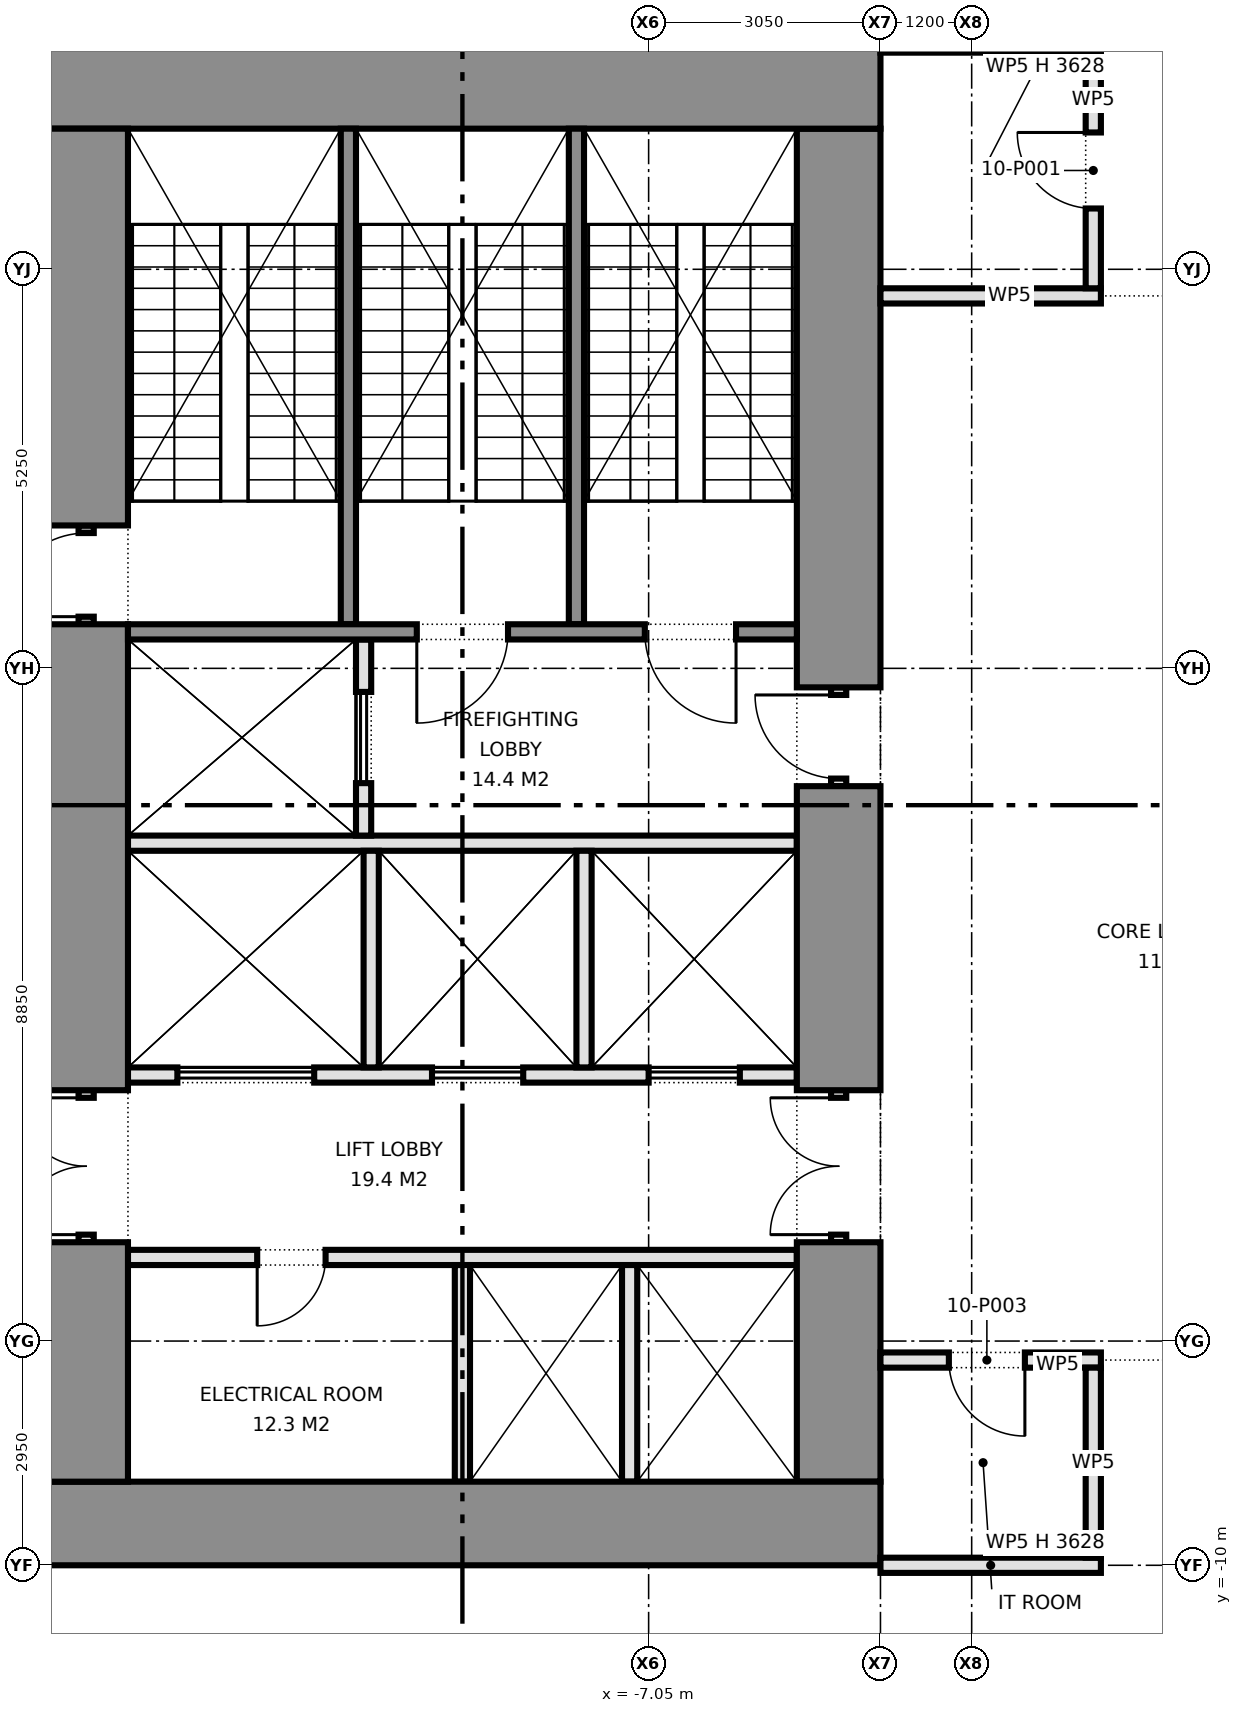
"""IFC4 building model, lengths in metres.
Left out: names, types, materials, properties, quantities, classifications, styles, units other than length and angle.
Written with IfcOpenShell. Run it as: python <this file> out.ifc"""

import sys

from ifc_helpers import new_model, si_unit, direction, frame, frame_2d, origin, place, context, subcontext, project, spatial, rectangle, extrude, element, fill, save


model = new_model("IFC4")
c1 = context("Model", 3, precision=1e-05, world=origin(), true_north=direction((0.0, 1.0)))
c2 = subcontext(c1, "Body", "Model", "MODEL_VIEW")
j1 = project(units=[si_unit("LENGTHUNIT", "METRE"), si_unit("PLANEANGLEUNIT", "RADIAN")], contexts=[c1])
p1 = place(None, origin())
s1 = spatial("IfcSite", under=j1, at=p1, CompositionType="ELEMENT")
p2 = place(p1, origin())
s2 = spatial("IfcBuilding", under=s1, at=p2, CompositionType="ELEMENT")
p3 = place(p2, frame((0.0, 0.0, 44.9)))
s3 = spatial("IfcBuildingStorey", under=s2, at=p3, CompositionType="ELEMENT", Elevation=44.9)
for number, where, z_axis, x_axis in (
    (1, (-15.0, -9.45, 0.0), (0.0, 0.0, 1.0), (1.0, 0.0, 0.0)),
    (2, (-15.0, 9.45, 0.0), (0.0, 0.0, 1.0), (1.0, 0.0, 0.0)),
):
    element("IfcWall", number, at=place(p3, frame(where, z_axis=z_axis, x_axis=x_axis)), inside=s3, PredefinedType="SHEAR", context=c2, shape_type="SweptSolid", body=[
        extrude(rectangle(XDim=11.0, YDim=1.1, at=frame_2d((5.5, 0.0))), origin(), (0.0, 0.0, 1.0), 4.575),
    ])
p4 = place(p3, frame((-14.45, -8.9, 0.0), z_axis=(0.0, 0.0, 1.0), x_axis=(0.0, 1.0, 0.0)))
e3 = element("IfcWall", 3, at=p4, inside=s3, PredefinedType="SHEAR", context=c2, shape_type="SweptSolid", body=[
    extrude(rectangle(XDim=3.15, YDim=1.1, at=frame_2d((1.575, 0.0))), origin(), (0.0, 0.0, 1.0), 4.575),
])
p5 = place(p3, frame((-14.45, -5.75, 0.0), z_axis=(0.0, 0.0, 1.0), x_axis=(0.0, 1.0, 0.0)))
e4 = element("IfcWall", 4, at=p5, inside=s3, PredefinedType="PARTITIONING", context=c2, shape_type="SweptSolid", body=[
    extrude(rectangle(XDim=2.0, YDim=0.2, at=frame_2d((1.0, 0.0))), origin(), (0.0, 0.0, 1.0), 2.4),
])
p6 = place(p5, frame((0.1, 0.0, 0.0)))
e5 = element("IfcOpeningElement", 5, at=p6, cuts=e4, PredefinedType="OPENING", context=c2, shape_type="SweptSolid", body=[
    extrude(rectangle(XDim=1.8, YDim=2.1, at=frame_2d((0.9, 1.05))), frame((0.0, 0.11, 0.0), z_axis=(0.0, -1.0, 0.0), x_axis=(1.0, 0.0, 0.0)), (0.0, 0.0, 1.0), 0.22),
])
p7 = place(p3, frame((-14.45, -3.75, 0.0), z_axis=(0.0, 0.0, 1.0), x_axis=(0.0, 1.0, 0.0)))
e6 = element("IfcWall", 6, at=p7, inside=s3, PredefinedType="SHEAR", context=c2, shape_type="SweptSolid", body=[
    extrude(rectangle(XDim=6.13, YDim=1.1, at=frame_2d((3.065, 0.0))), origin(), (0.0, 0.0, 1.0), 4.575),
])
p8 = place(p3, frame((-14.45, 2.38, 0.0), z_axis=(0.0, 0.0, 1.0), x_axis=(0.0, 1.0, 0.0)))
e7 = element("IfcWall", 7, at=p8, inside=s3, PredefinedType="SHEAR", context=c2, shape_type="SweptSolid", body=[
    extrude(rectangle(XDim=1.3, YDim=0.2, at=frame_2d((0.65, 0.0))), origin(), (0.0, 0.0, 1.0), 2.4),
])
p9 = place(p8, frame((0.1, 0.0, 0.0)))
e8 = element("IfcOpeningElement", 8, at=p9, cuts=e7, PredefinedType="OPENING", context=c2, shape_type="SweptSolid", body=[
    extrude(rectangle(XDim=1.1, YDim=2.1, at=frame_2d((0.55, 1.05))), frame((0.0, 0.11, 0.0), z_axis=(0.0, -1.0, 0.0), x_axis=(1.0, 0.0, 0.0)), (0.0, 0.0, 1.0), 0.22),
])
p10 = place(p3, frame((-14.45, 3.68, 0.0), z_axis=(0.0, 0.0, 1.0), x_axis=(0.0, 1.0, 0.0)))
e9 = element("IfcWall", 9, at=p10, inside=s3, PredefinedType="SHEAR", context=c2, shape_type="SweptSolid", body=[
    extrude(rectangle(XDim=5.22, YDim=1.1, at=frame_2d((2.61, 0.0))), origin(), (0.0, 0.0, 1.0), 4.575),
])
p11 = place(p3, frame((-4.55, -8.9, 0.0), z_axis=(0.0, 0.0, 1.0), x_axis=(0.0, 1.0, 0.0)))
e10 = element("IfcWall", 10, at=p11, inside=s3, PredefinedType="SHEAR", context=c2, shape_type="SweptSolid", body=[
    extrude(rectangle(XDim=3.15, YDim=1.1, at=frame_2d((1.575, 0.0))), origin(), (0.0, 0.0, 1.0), 4.575),
])
p12 = place(p3, frame((-4.55, -5.75, 0.0), z_axis=(0.0, 0.0, 1.0), x_axis=(0.0, 1.0, 0.0)))
e11 = element("IfcWall", 11, at=p12, inside=s3, PredefinedType="PARTITIONING", context=c2, shape_type="SweptSolid", body=[
    extrude(rectangle(XDim=2.0, YDim=0.2, at=frame_2d((1.0, 0.0))), origin(), (0.0, 0.0, 1.0), 2.4),
])
p13 = place(p12, frame((0.1, 0.0, 0.0)))
e12 = element("IfcOpeningElement", 12, at=p13, cuts=e11, PredefinedType="OPENING", context=c2, shape_type="SweptSolid", body=[
    extrude(rectangle(XDim=1.8, YDim=2.1, at=frame_2d((0.9, 1.05))), frame((0.0, 0.11, 0.0), z_axis=(0.0, -1.0, 0.0), x_axis=(1.0, 0.0, 0.0)), (0.0, 0.0, 1.0), 0.22),
])
p14 = place(p3, frame((-4.55, -3.75, 0.0), z_axis=(0.0, 0.0, 1.0), x_axis=(0.0, 1.0, 0.0)))
e13 = element("IfcWall", 13, at=p14, inside=s3, PredefinedType="SHEAR", context=c2, shape_type="SweptSolid", body=[
    extrude(rectangle(XDim=4.0, YDim=1.1, at=frame_2d((2.0, 0.0))), origin(), (0.0, 0.0, 1.0), 4.575),
])
p15 = place(p3, frame((-4.55, 0.25, 0.0), z_axis=(0.0, 0.0, 1.0), x_axis=(0.0, 1.0, 0.0)))
e14 = element("IfcWall", 14, at=p15, inside=s3, PredefinedType="PARTITIONING", context=c2, shape_type="SweptSolid", body=[
    extrude(rectangle(XDim=1.3, YDim=0.2, at=frame_2d((0.65, 0.0))), origin(), (0.0, 0.0, 1.0), 2.4),
])
p16 = place(p15, frame((0.1, 0.0, 0.0)))
e15 = element("IfcOpeningElement", 15, at=p16, cuts=e14, PredefinedType="OPENING", context=c2, shape_type="SweptSolid", body=[
    extrude(rectangle(XDim=1.1, YDim=2.1, at=frame_2d((0.55, 1.05))), frame((0.0, 0.11, 0.0), z_axis=(0.0, -1.0, 0.0), x_axis=(1.0, 0.0, 0.0)), (0.0, 0.0, 1.0), 0.22),
])
p17 = place(p3, frame((-4.55, 1.55, 0.0), z_axis=(0.0, 0.0, 1.0), x_axis=(0.0, 1.0, 0.0)))
e16 = element("IfcWall", 16, at=p17, inside=s3, PredefinedType="SHEAR", context=c2, shape_type="SweptSolid", body=[
    extrude(rectangle(XDim=7.35, YDim=1.1, at=frame_2d((3.675, 0.0))), origin(), (0.0, 0.0, 1.0), 4.575),
])
p18 = place(p3, frame((-13.9, -5.95, 0.0), z_axis=(0.0, 0.0, 1.0), x_axis=(1.0, 0.0, 0.0)))
e17 = element("IfcWall", 17, at=p18, inside=s3, PredefinedType="PARTITIONING", context=c2, shape_type="SweptSolid", body=[
    extrude(rectangle(XDim=8.8, YDim=0.2, at=frame_2d((4.4, 0.0))), origin(), (0.0, 0.0, 1.0), 4.575),
])
p19 = place(p18, frame((1.7, 0.0, 0.0)))
e18 = element("IfcOpeningElement", 18, at=p19, cuts=e17, PredefinedType="OPENING", context=c2, shape_type="SweptSolid", body=[
    extrude(rectangle(XDim=0.9, YDim=2.1, at=frame_2d((0.45, 1.05))), frame((0.0, 0.11, 0.0), z_axis=(0.0, -1.0, 0.0), x_axis=(1.0, 0.0, 0.0)), (0.0, 0.0, 1.0), 0.22),
])
p20 = place(p3, frame((-13.9, -3.55, 0.0), z_axis=(0.0, 0.0, 1.0), x_axis=(1.0, 0.0, 0.0)))
e19 = element("IfcWall", 19, at=p20, inside=s3, PredefinedType="PARTITIONING", context=c2, shape_type="SweptSolid", body=[
    extrude(rectangle(XDim=8.8, YDim=0.2, at=frame_2d((4.4, 0.0))), origin(), (0.0, 0.0, 1.0), 4.575),
])
p21 = place(p20, frame((0.65, 0.0, 0.0)))
e20 = element("IfcOpeningElement", 20, at=p21, cuts=e19, PredefinedType="OPENING", context=c2, shape_type="SweptSolid", body=[
    extrude(rectangle(XDim=1.8, YDim=2.1, at=frame_2d((0.9, 1.05))), frame((0.0, 0.11, 0.0), z_axis=(0.0, -1.0, 0.0), x_axis=(1.0, 0.0, 0.0)), (0.0, 0.0, 1.0), 0.22),
])
p22 = place(p20, frame((4.0, 0.0, 0.0)))
e21 = element("IfcOpeningElement", 21, at=p22, cuts=e19, PredefinedType="OPENING", context=c2, shape_type="SweptSolid", body=[
    extrude(rectangle(XDim=1.2, YDim=2.1, at=frame_2d((0.6, 1.05))), frame((0.0, 0.11, 0.0), z_axis=(0.0, -1.0, 0.0), x_axis=(1.0, 0.0, 0.0)), (0.0, 0.0, 1.0), 0.22),
])
p23 = place(p20, frame((6.85, 0.0, 0.0)))
e22 = element("IfcOpeningElement", 22, at=p23, cuts=e19, PredefinedType="OPENING", context=c2, shape_type="SweptSolid", body=[
    extrude(rectangle(XDim=1.2, YDim=2.1, at=frame_2d((0.6, 1.05))), frame((0.0, 0.11, 0.0), z_axis=(0.0, -1.0, 0.0), x_axis=(1.0, 0.0, 0.0)), (0.0, 0.0, 1.0), 0.22),
])
p24 = place(p3, frame((-13.9, -0.5, 0.0), z_axis=(0.0, 0.0, 1.0), x_axis=(1.0, 0.0, 0.0)))
e23 = element("IfcWall", 23, at=p24, inside=s3, PredefinedType="PARTITIONING", context=c2, shape_type="SweptSolid", body=[
    extrude(rectangle(XDim=8.8, YDim=0.2, at=frame_2d((4.4, 0.0))), origin(), (0.0, 0.0, 1.0), 4.575),
])
p25 = place(p3, frame((-10.8, -0.4, 0.0), z_axis=(0.0, 0.0, 1.0), x_axis=(0.0, 1.0, 0.0)))
e24 = element("IfcWall", 24, at=p25, inside=s3, PredefinedType="PARTITIONING", context=c2, shape_type="SweptSolid", body=[
    extrude(rectangle(XDim=2.58, YDim=0.2, at=frame_2d((1.29, 0.0))), origin(), (0.0, 0.0, 1.0), 4.575),
])
p26 = place(p25, frame((0.69, 0.0, 0.0)))
e25 = element("IfcOpeningElement", 25, at=p26, cuts=e24, PredefinedType="OPENING", context=c2, shape_type="SweptSolid", body=[
    extrude(rectangle(XDim=1.2, YDim=2.1, at=frame_2d((0.6, 1.05))), frame((0.0, 0.11, 0.0), z_axis=(0.0, -1.0, 0.0), x_axis=(1.0, 0.0, 0.0)), (0.0, 0.0, 1.0), 0.22),
])
p27 = place(p3, frame((-13.9, 2.28, 0.0), z_axis=(0.0, 0.0, 1.0), x_axis=(1.0, 0.0, 0.0)))
e26 = element("IfcWall", 26, at=p27, inside=s3, PredefinedType="SHEAR", context=c2, shape_type="SweptSolid", body=[
    extrude(rectangle(XDim=8.8, YDim=0.2, at=frame_2d((4.4, 0.0))), origin(), (0.0, 0.0, 1.0), 4.575),
])
p28 = place(p27, frame((3.8, 0.0, 0.0)))
e27 = element("IfcOpeningElement", 27, at=p28, cuts=e26, PredefinedType="OPENING", context=c2, shape_type="SweptSolid", body=[
    extrude(rectangle(XDim=1.2, YDim=2.1, at=frame_2d((0.6, 1.05))), frame((0.0, 0.11, 0.0), z_axis=(0.0, -1.0, 0.0), x_axis=(1.0, 0.0, 0.0)), (0.0, 0.0, 1.0), 0.22),
])
p29 = place(p27, frame((6.8, 0.0, 0.0)))
e28 = element("IfcOpeningElement", 28, at=p29, cuts=e26, PredefinedType="OPENING", context=c2, shape_type="SweptSolid", body=[
    extrude(rectangle(XDim=1.2, YDim=2.1, at=frame_2d((0.6, 1.05))), frame((0.0, 0.11, 0.0), z_axis=(0.0, -1.0, 0.0), x_axis=(1.0, 0.0, 0.0)), (0.0, 0.0, 1.0), 0.22),
])
for number, where, z_axis, x_axis in (
    (29, (-11.0, 2.38, 0.0), (0.0, 0.0, 1.0), (0.0, 1.0, 0.0)),
    (30, (-8.0, 2.38, 0.0), (0.0, 0.0, 1.0), (0.0, 1.0, 0.0)),
):
    element("IfcWall", number, at=place(p3, frame(where, z_axis=z_axis, x_axis=x_axis)), inside=s3, PredefinedType="SHEAR", context=c2, shape_type="SweptSolid", body=[
        extrude(rectangle(XDim=6.52, YDim=0.2, at=frame_2d((3.26, 0.0))), origin(), (0.0, 0.0, 1.0), 4.575),
    ])
for number, where, z_axis, x_axis in (
    (31, (-9.5, -8.9, 0.0), (0.0, 0.0, 1.0), (0.0, 1.0, 0.0)),
    (32, (-7.3, -8.9, 0.0), (0.0, 0.0, 1.0), (0.0, 1.0, 0.0)),
    (33, (-10.7, -3.45, 0.0), (0.0, 0.0, 1.0), (0.0, 1.0, 0.0)),
    (34, (-7.9, -3.45, 0.0), (0.0, 0.0, 1.0), (0.0, 1.0, 0.0)),
):
    element("IfcWall", number, at=place(p3, frame(where, z_axis=z_axis, x_axis=x_axis)), inside=s3, PredefinedType="PARTITIONING", context=c2, shape_type="SweptSolid", body=[
        extrude(rectangle(XDim=2.85, YDim=0.2, at=frame_2d((1.425, 0.0))), origin(), (0.0, 0.0, 1.0), 4.575),
    ])
p30 = place(p3, frame((-4.0, -10.0, 0.0), z_axis=(0.0, 0.0, 1.0), x_axis=(1.0, 0.0, 0.0)))
e35 = element("IfcWall", 35, at=p30, inside=s3, PredefinedType="PARTITIONING", context=c2, shape_type="SweptSolid", body=[
    extrude(rectangle(XDim=2.9, YDim=0.2, at=frame_2d((1.45, 0.0))), origin(), (0.0, 0.0, 1.0), 3.628),
])
p31 = place(p3, frame((-4.0, -7.3, 0.0), z_axis=(0.0, 0.0, 1.0), x_axis=(1.0, 0.0, 0.0)))
e36 = element("IfcWall", 36, at=p31, inside=s3, PredefinedType="PARTITIONING", context=c2, shape_type="SweptSolid", body=[
    extrude(rectangle(XDim=2.9, YDim=0.2, at=frame_2d((1.45, 0.0))), origin(), (0.0, 0.0, 1.0), 4.575),
])
p32 = place(p31, frame((0.9, 0.0, 0.0)))
e37 = element("IfcOpeningElement", 37, at=p32, cuts=e36, PredefinedType="OPENING", context=c2, shape_type="SweptSolid", body=[
    extrude(rectangle(XDim=1.0, YDim=2.1, at=frame_2d((0.5, 1.05))), frame((0.0, 0.11, 0.0), z_axis=(0.0, -1.0, 0.0), x_axis=(1.0, 0.0, 0.0)), (0.0, 0.0, 1.0), 0.22),
])
p33 = place(p3, frame((-4.0, 6.7, 0.0), z_axis=(0.0, 0.0, 1.0), x_axis=(1.0, 0.0, 0.0)))
e38 = element("IfcWall", 38, at=p33, inside=s3, PredefinedType="PARTITIONING", context=c2, shape_type="SweptSolid", body=[
    extrude(rectangle(XDim=2.9, YDim=0.2, at=frame_2d((1.45, 0.0))), origin(), (0.0, 0.0, 1.0), 4.575),
])
p34 = place(p3, frame((-1.2, -9.9, 0.0), z_axis=(0.0, 0.0, 1.0), x_axis=(0.0, 1.0, 0.0)))
e39 = element("IfcWall", 39, at=p34, inside=s3, PredefinedType="PARTITIONING", context=c2, shape_type="SweptSolid", body=[
    extrude(rectangle(XDim=2.5, YDim=0.2, at=frame_2d((1.25, 0.0))), origin(), (0.0, 0.0, 1.0), 4.575),
])
p35 = place(p3, frame((-1.2, 6.8, 0.0), z_axis=(0.0, 0.0, 1.0), x_axis=(0.0, 1.0, 0.0)))
e40 = element("IfcWall", 40, at=p35, inside=s3, PredefinedType="PARTITIONING", context=c2, shape_type="SweptSolid", body=[
    extrude(rectangle(XDim=3.1, YDim=0.2, at=frame_2d((1.55, 0.0))), origin(), (0.0, 0.0, 1.0), 4.575),
])
p36 = place(p35, frame((1.05, 0.0, 0.0)))
e41 = element("IfcOpeningElement", 41, at=p36, cuts=e40, PredefinedType="OPENING", context=c2, shape_type="SweptSolid", body=[
    extrude(rectangle(XDim=1.0, YDim=2.1, at=frame_2d((0.5, 1.05))), frame((0.0, 0.11, 0.0), z_axis=(0.0, -1.0, 0.0), x_axis=(1.0, 0.0, 0.0)), (0.0, 0.0, 1.0), 0.22),
])
p37 = place(p6, origin())
e42 = element("IfcDoor", 42, at=p37, inside=s3, OperationType="DOUBLE_DOOR_SINGLE_SWING", PredefinedType="DOOR", context=c2, shape_type="SweptSolid", body=[
    extrude(rectangle(XDim=1.8, YDim=2.1, at=frame_2d((0.9, 1.05))), frame((0.0, 0.025, 0.0), z_axis=(0.0, -1.0, 0.0), x_axis=(1.0, 0.0, 0.0)), (0.0, 0.0, 1.0), 0.05),
])
fill(e5, e42)
p38 = place(p9, origin())
e43 = element("IfcDoor", 43, at=p38, inside=s3, OperationType="SINGLE_SWING_LEFT", PredefinedType="DOOR", context=c2, shape_type="SweptSolid", body=[
    extrude(rectangle(XDim=1.1, YDim=2.1, at=frame_2d((0.55, 1.05))), frame((0.0, 0.025, 0.0), z_axis=(0.0, -1.0, 0.0), x_axis=(1.0, 0.0, 0.0)), (0.0, 0.0, 1.0), 0.05),
])
fill(e8, e43)
p39 = place(p13, origin())
e44 = element("IfcDoor", 44, at=p39, inside=s3, OperationType="DOUBLE_DOOR_SINGLE_SWING", PredefinedType="DOOR", context=c2, shape_type="SweptSolid", body=[
    extrude(rectangle(XDim=1.8, YDim=2.1, at=frame_2d((0.9, 1.05))), frame((0.0, 0.025, 0.0), z_axis=(0.0, -1.0, 0.0), x_axis=(1.0, 0.0, 0.0)), (0.0, 0.0, 1.0), 0.05),
])
fill(e12, e44)
p40 = place(p16, origin())
e45 = element("IfcDoor", 45, at=p40, inside=s3, OperationType="SINGLE_SWING_RIGHT", PredefinedType="DOOR", context=c2, shape_type="SweptSolid", body=[
    extrude(rectangle(XDim=1.1, YDim=2.1, at=frame_2d((0.55, 1.05))), frame((0.0, 0.025, 0.0), z_axis=(0.0, -1.0, 0.0), x_axis=(1.0, 0.0, 0.0)), (0.0, 0.0, 1.0), 0.05),
])
fill(e15, e45)
p41 = place(p21, origin())
e46 = element("IfcDoor", 46, at=p41, inside=s3, OperationType="DOUBLE_DOOR_SLIDING", PredefinedType="DOOR", context=c2, shape_type="SweptSolid", body=[
    extrude(rectangle(XDim=1.8, YDim=2.1, at=frame_2d((0.9, 1.05))), frame((0.0, 0.025, 0.0), z_axis=(0.0, -1.0, 0.0), x_axis=(1.0, 0.0, 0.0)), (0.0, 0.0, 1.0), 0.05),
])
fill(e20, e46)
p42 = place(p22, origin())
e47 = element("IfcDoor", 47, at=p42, inside=s3, OperationType="DOUBLE_DOOR_SLIDING", PredefinedType="DOOR", context=c2, shape_type="SweptSolid", body=[
    extrude(rectangle(XDim=1.2, YDim=2.1, at=frame_2d((0.6, 1.05))), frame((0.0, 0.025, 0.0), z_axis=(0.0, -1.0, 0.0), x_axis=(1.0, 0.0, 0.0)), (0.0, 0.0, 1.0), 0.05),
])
fill(e21, e47)
p43 = place(p23, origin())
e48 = element("IfcDoor", 48, at=p43, inside=s3, OperationType="DOUBLE_DOOR_SLIDING", PredefinedType="DOOR", context=c2, shape_type="SweptSolid", body=[
    extrude(rectangle(XDim=1.2, YDim=2.1, at=frame_2d((0.6, 1.05))), frame((0.0, 0.025, 0.0), z_axis=(0.0, -1.0, 0.0), x_axis=(1.0, 0.0, 0.0)), (0.0, 0.0, 1.0), 0.05),
])
fill(e22, e48)
p44 = place(p26, origin())
e49 = element("IfcDoor", 49, at=p44, inside=s3, OperationType="DOUBLE_DOOR_SLIDING", PredefinedType="DOOR", context=c2, shape_type="SweptSolid", body=[
    extrude(rectangle(XDim=1.2, YDim=2.1, at=frame_2d((0.6, 1.05))), frame((0.0, 0.025, 0.0), z_axis=(0.0, -1.0, 0.0), x_axis=(1.0, 0.0, 0.0)), (0.0, 0.0, 1.0), 0.05),
])
fill(e25, e49)
p45 = place(p19, frame((0.9, 0.0, 0.0), z_axis=(0.0, 0.0, 1.0), x_axis=(-1.0, 0.0, 0.0)))
e50 = element("IfcDoor", 50, at=p45, inside=s3, OperationType="SINGLE_SWING_RIGHT", PredefinedType="DOOR", context=c2, shape_type="SweptSolid", body=[
    extrude(rectangle(XDim=0.9, YDim=2.1, at=frame_2d((0.45, 1.05))), frame((0.0, 0.025, 0.0), z_axis=(0.0, -1.0, 0.0), x_axis=(1.0, 0.0, 0.0)), (0.0, 0.0, 1.0), 0.05),
])
fill(e18, e50)
p46 = place(p28, frame((1.2, 0.0, 0.0), z_axis=(0.0, 0.0, 1.0), x_axis=(-1.0, 0.0, 0.0)))
e51 = element("IfcDoor", 51, at=p46, inside=s3, OperationType="SINGLE_SWING_RIGHT", PredefinedType="DOOR", context=c2, shape_type="SweptSolid", body=[
    extrude(rectangle(XDim=1.2, YDim=2.1, at=frame_2d((0.6, 1.05))), frame((0.0, 0.025, 0.0), z_axis=(0.0, -1.0, 0.0), x_axis=(1.0, 0.0, 0.0)), (0.0, 0.0, 1.0), 0.05),
])
fill(e27, e51)
p47 = place(p29, frame((1.2, 0.0, 0.0), z_axis=(0.0, 0.0, 1.0), x_axis=(-1.0, 0.0, 0.0)))
e52 = element("IfcDoor", 52, at=p47, inside=s3, OperationType="SINGLE_SWING_LEFT", PredefinedType="DOOR", context=c2, shape_type="SweptSolid", body=[
    extrude(rectangle(XDim=1.2, YDim=2.1, at=frame_2d((0.6, 1.05))), frame((0.0, 0.025, 0.0), z_axis=(0.0, -1.0, 0.0), x_axis=(1.0, 0.0, 0.0)), (0.0, 0.0, 1.0), 0.05),
])
fill(e28, e52)
p48 = place(p36, origin())
e53 = element("IfcDoor", 53, at=p48, inside=s3, OperationType="SINGLE_SWING_RIGHT", PredefinedType="DOOR", context=c2, shape_type="SweptSolid", body=[
    extrude(rectangle(XDim=1.0, YDim=2.1, at=frame_2d((0.5, 1.05))), frame((0.0, 0.025, 0.0), z_axis=(0.0, -1.0, 0.0), x_axis=(1.0, 0.0, 0.0)), (0.0, 0.0, 1.0), 0.05),
])
fill(e41, e53)
p49 = place(p32, frame((1.0, 0.0, 0.0), z_axis=(0.0, 0.0, 1.0), x_axis=(-1.0, 0.0, 0.0)))
e54 = element("IfcDoor", 54, at=p49, inside=s3, OperationType="SINGLE_SWING_LEFT", PredefinedType="DOOR", context=c2, shape_type="SweptSolid", body=[
    extrude(rectangle(XDim=1.0, YDim=2.1, at=frame_2d((0.5, 1.05))), frame((0.0, 0.025, 0.0), z_axis=(0.0, -1.0, 0.0), x_axis=(1.0, 0.0, 0.0)), (0.0, 0.0, 1.0), 0.05),
])
fill(e37, e54)
save(model, sys.argv[1])
